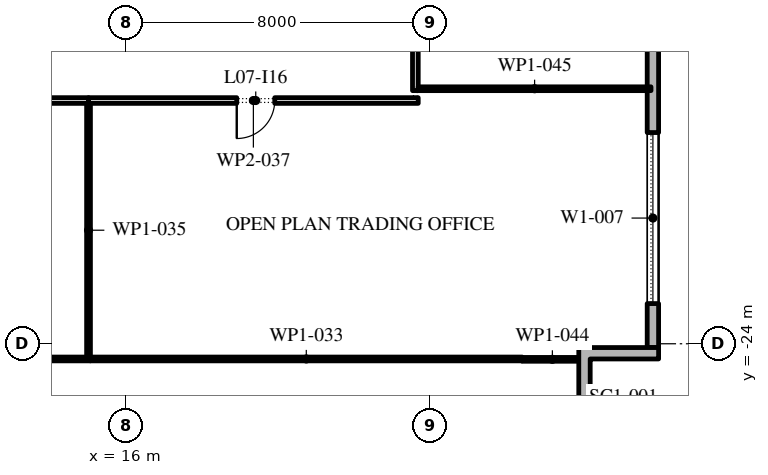
"""IFC4 building model, lengths in metres.
Left out: names, types, materials, properties, quantities, classifications, styles, units other than length and angle.
Written with IfcOpenShell. Run it as: python <this file> out.ifc"""

import sys

from ifc_helpers import new_model, si_unit, direction, frame, frame_2d, origin, place, context, subcontext, project, spatial, polyline, rectangle, outline, extrude, element, fill, save


model = new_model("IFC4")
c1 = context("Model", 3, precision=1e-05, world=origin(), true_north=direction((0.0, 1.0)))
c2 = subcontext(c1, "Body", "Model", "MODEL_VIEW")
j1 = project(units=[si_unit("LENGTHUNIT", "METRE"), si_unit("PLANEANGLEUNIT", "RADIAN")], contexts=[c1])
p1 = place(None, origin())
s1 = spatial("IfcSite", under=j1, at=p1, CompositionType="ELEMENT")
p2 = place(p1, origin())
s2 = spatial("IfcBuilding", under=s1, at=p2, CompositionType="ELEMENT")
p3 = place(p2, frame((0.0, 0.0, 39.6)))
s3 = spatial("IfcBuildingStorey", under=s2, at=p3, CompositionType="ELEMENT", Elevation=39.6)
p4 = place(p3, frame((29.85, -24.1, 0.0), z_axis=(0.0, 0.0, 1.0), x_axis=(0.0, 1.0, 0.0)))
e1 = element("IfcWall", 1, at=p4, inside=s3, PredefinedType="STANDARD", context=c2, shape_type="SweptSolid", body=[
    extrude(rectangle(XDim=49.5, YDim=0.3, at=frame_2d((24.75, 0.0))), origin(), (0.0, 0.0, 1.0), 4.0),
])
p5 = place(p4, frame((1.157, 0.0, 0.45)))
e2 = element("IfcOpeningElement", 2, at=p5, cuts=e1, PredefinedType="OPENING", context=c2, shape_type="SweptSolid", body=[
    extrude(rectangle(XDim=4.5, YDim=3.05, at=frame_2d((2.25, 1.525))), frame((0.0, 0.16, 0.0), z_axis=(0.0, -1.0, 0.0), x_axis=(1.0, 0.0, 0.0)), (0.0, 0.0, 1.0), 0.32),
])
p6 = place(p4, frame((8.121, 0.0, 0.45)))
e3 = element("IfcOpeningElement", 3, at=p6, cuts=e1, PredefinedType="OPENING", context=c2, shape_type="SweptSolid", body=[
    extrude(rectangle(XDim=4.5, YDim=2.825, at=frame_2d((2.25, 1.413))), frame((0.0, 0.16, 0.0), z_axis=(0.0, -1.0, 0.0), x_axis=(1.0, 0.0, 0.0)), (0.0, 0.0, 1.0), 0.32),
])
p7 = place(p4, frame((16.286, 0.0, 0.0)))
e4 = element("IfcOpeningElement", 4, at=p7, cuts=e1, PredefinedType="OPENING", context=c2, shape_type="SweptSolid", body=[
    extrude(rectangle(XDim=2.4, YDim=3.325, at=frame_2d((1.2, 1.663))), frame((0.0, 0.16, 0.0), z_axis=(0.0, -1.0, 0.0), x_axis=(1.0, 0.0, 0.0)), (0.0, 0.0, 1.0), 0.32),
])
p8 = place(p4, frame((22.35, 0.0, 0.45)))
e5 = element("IfcOpeningElement", 5, at=p8, cuts=e1, PredefinedType="OPENING", context=c2, shape_type="SweptSolid", body=[
    extrude(rectangle(XDim=4.5, YDim=2.875, at=frame_2d((2.25, 1.438))), frame((0.0, 0.16, 0.0), z_axis=(0.0, -1.0, 0.0), x_axis=(1.0, 0.0, 0.0)), (0.0, 0.0, 1.0), 0.32),
])
p9 = place(p4, frame((29.464, 0.0, 0.45)))
e6 = element("IfcOpeningElement", 6, at=p9, cuts=e1, PredefinedType="OPENING", context=c2, shape_type="SweptSolid", body=[
    extrude(rectangle(XDim=4.5, YDim=2.875, at=frame_2d((2.25, 1.438))), frame((0.0, 0.16, 0.0), z_axis=(0.0, -1.0, 0.0), x_axis=(1.0, 0.0, 0.0)), (0.0, 0.0, 1.0), 0.32),
])
p10 = place(p4, frame((36.579, 0.0, 0.45)))
e7 = element("IfcOpeningElement", 7, at=p10, cuts=e1, PredefinedType="OPENING", context=c2, shape_type="SweptSolid", body=[
    extrude(rectangle(XDim=4.5, YDim=3.05, at=frame_2d((2.25, 1.525))), frame((0.0, 0.16, 0.0), z_axis=(0.0, -1.0, 0.0), x_axis=(1.0, 0.0, 0.0)), (0.0, 0.0, 1.0), 0.32),
])
p11 = place(p4, frame((44.743, 0.0, 0.0)))
e8 = element("IfcOpeningElement", 8, at=p11, cuts=e1, PredefinedType="OPENING", context=c2, shape_type="SweptSolid", body=[
    extrude(rectangle(XDim=2.4, YDim=3.325, at=frame_2d((1.2, 1.663))), frame((0.0, 0.16, 0.0), z_axis=(0.0, -1.0, 0.0), x_axis=(1.0, 0.0, 0.0)), (0.0, 0.0, 1.0), 0.32),
])
p12 = place(p3, origin())
e9 = element("IfcWall", 9, at=p12, inside=s3, PredefinedType="STANDARD", context=c2, shape_type="SweptSolid", body=[
    extrude(outline(polyline([(27.9, -25.9), (27.9, -24.1), (30.0, -24.1), (30.0, -24.4), (28.2, -24.4), (28.2, -26.2), (26.4, -26.2), (26.4, -27.7), (26.1, -27.7), (26.1, -25.9), (27.9, -25.9)])), origin(), (0.0, 0.0, 1.0), 4.0),
])
p13 = place(p3, frame((1.45, -24.4, 0.0), z_axis=(0.0, 0.0, 1.0), x_axis=(1.0, 0.0, 0.0)))
e10 = element("IfcWall", 10, at=p13, inside=s3, PredefinedType="PARTITIONING", context=c2, shape_type="SweptSolid", body=[
    extrude(rectangle(XDim=13.6, YDim=0.1, at=frame_2d((6.8, 0.0))), origin(), (0.0, 0.0, 1.0), 4.0),
])
p14 = place(p3, frame((15.05, -24.4, 0.0), z_axis=(0.0, 0.0, 1.0), x_axis=(1.0, 0.0, 0.0)))
e11 = element("IfcWall", 11, at=p14, inside=s3, PredefinedType="PARTITIONING", context=c2, shape_type="SweptSolid", body=[
    extrude(rectangle(XDim=11.36, YDim=0.1, at=frame_2d((5.68, 0.0))), origin(), (0.0, 0.0, 1.0), 4.0),
])
p15 = place(p3, frame((15.0, -17.6, 0.0), z_axis=(0.0, 0.0, 1.0), x_axis=(-1.0, 0.0, 0.0)))
e12 = element("IfcWall", 12, at=p15, inside=s3, PredefinedType="PARTITIONING", context=c2, shape_type="SweptSolid", body=[
    extrude(rectangle(XDim=6.525, YDim=0.15, at=frame_2d((3.262, 0.0))), origin(), (0.0, 0.0, 1.0), 4.0),
])
p16 = place(p15, frame((2.7, 0.0, 0.0)))
e13 = element("IfcOpeningElement", 13, at=p16, cuts=e12, PredefinedType="OPENING", context=c2, shape_type="SweptSolid", body=[
    extrude(rectangle(XDim=1.0, YDim=2.1, at=frame_2d((0.5, 1.05))), frame((0.0, 0.085, 0.0), z_axis=(0.0, -1.0, 0.0), x_axis=(1.0, 0.0, 0.0)), (0.0, 0.0, 1.0), 0.17),
])
p17 = place(p3, frame((15.0, -17.675, 0.0), z_axis=(0.0, 0.0, 1.0), x_axis=(0.0, -1.0, 0.0)))
e14 = element("IfcWall", 14, at=p17, inside=s3, PredefinedType="PARTITIONING", context=c2, shape_type="SweptSolid", body=[
    extrude(rectangle(XDim=6.675, YDim=0.1, at=frame_2d((3.337, 0.0))), origin(), (0.0, 0.0, 1.0), 4.0),
])
p18 = place(p3, frame((23.675, -17.6, 0.0), z_axis=(0.0, 0.0, 1.0), x_axis=(-1.0, 0.0, 0.0)))
e15 = element("IfcWall", 15, at=p18, inside=s3, PredefinedType="PARTITIONING", context=c2, shape_type="SweptSolid", body=[
    extrude(rectangle(XDim=8.675, YDim=0.15, at=frame_2d((4.337, 0.0))), origin(), (0.0, 0.0, 1.0), 4.0),
])
p19 = place(p18, frame((3.775, 0.0, 0.0)))
e16 = element("IfcOpeningElement", 16, at=p19, cuts=e15, PredefinedType="OPENING", context=c2, shape_type="SweptSolid", body=[
    extrude(rectangle(XDim=1.0, YDim=2.1, at=frame_2d((0.5, 1.05))), frame((0.0, 0.085, 0.0), z_axis=(0.0, -1.0, 0.0), x_axis=(1.0, 0.0, 0.0)), (0.0, 0.0, 1.0), 0.17),
])
p20 = place(p3, frame((23.6, -10.22, 0.0), z_axis=(0.0, 0.0, 1.0), x_axis=(0.0, -1.0, 0.0)))
e17 = element("IfcWall", 17, at=p20, inside=s3, PredefinedType="PARTITIONING", context=c2, shape_type="SweptSolid", body=[
    extrude(rectangle(XDim=7.12, YDim=0.15, at=frame_2d((3.56, 0.0))), origin(), (0.0, 0.0, 1.0), 4.0),
])
p21 = place(p20, frame((2.42, 0.0, 0.0)))
e18 = element("IfcOpeningElement", 18, at=p21, cuts=e17, PredefinedType="OPENING", context=c2, shape_type="SweptSolid", body=[
    extrude(rectangle(XDim=1.0, YDim=2.1, at=frame_2d((0.5, 1.05))), frame((0.0, 0.085, 0.0), z_axis=(0.0, -1.0, 0.0), x_axis=(1.0, 0.0, 0.0)), (0.0, 0.0, 1.0), 0.17),
])
p22 = place(p3, frame((26.41, -24.41, 0.0), z_axis=(0.0, 0.0, 1.0), x_axis=(1.0, 0.0, 0.0)))
e19 = element("IfcWall", 19, at=p22, inside=s3, PredefinedType="PARTITIONING", context=c2, shape_type="SweptSolid", body=[
    extrude(rectangle(XDim=1.59, YDim=0.1, at=frame_2d((0.795, 0.0))), origin(), (0.0, 0.0, 1.0), 4.0),
])
p23 = place(p3, frame((29.8, -17.29, 0.0), z_axis=(0.0, 0.0, 1.0), x_axis=(-1.0, 0.0, 0.0)))
e20 = element("IfcWall", 20, at=p23, inside=s3, PredefinedType="PARTITIONING", context=c2, shape_type="SweptSolid", body=[
    extrude(rectangle(XDim=6.125, YDim=0.1, at=frame_2d((3.062, 0.0))), origin(), (0.0, 0.0, 1.0), 4.0),
])
p24 = place(p5, origin())
e21 = element("IfcWindow", 21, at=p24, inside=s3, PartitioningType="DOUBLE_PANEL_VERTICAL", PredefinedType="WINDOW", context=c2, shape_type="SweptSolid", body=[
    extrude(rectangle(XDim=4.5, YDim=3.05, at=frame_2d((2.25, 1.525))), frame((0.0, 0.03, 0.0), z_axis=(0.0, -1.0, 0.0), x_axis=(1.0, 0.0, 0.0)), (0.0, 0.0, 1.0), 0.06),
])
fill(e2, e21)
p25 = place(p19, origin())
e22 = element("IfcDoor", 22, at=p25, inside=s3, OperationType="SINGLE_SWING_LEFT", PredefinedType="DOOR", context=c2, shape_type="SweptSolid", body=[
    extrude(rectangle(XDim=1.0, YDim=2.1, at=frame_2d((0.5, 1.05))), frame((0.0, 0.025, 0.0), z_axis=(0.0, -1.0, 0.0), x_axis=(1.0, 0.0, 0.0)), (0.0, 0.0, 1.0), 0.05),
])
fill(e16, e22)
save(model, sys.argv[1])
